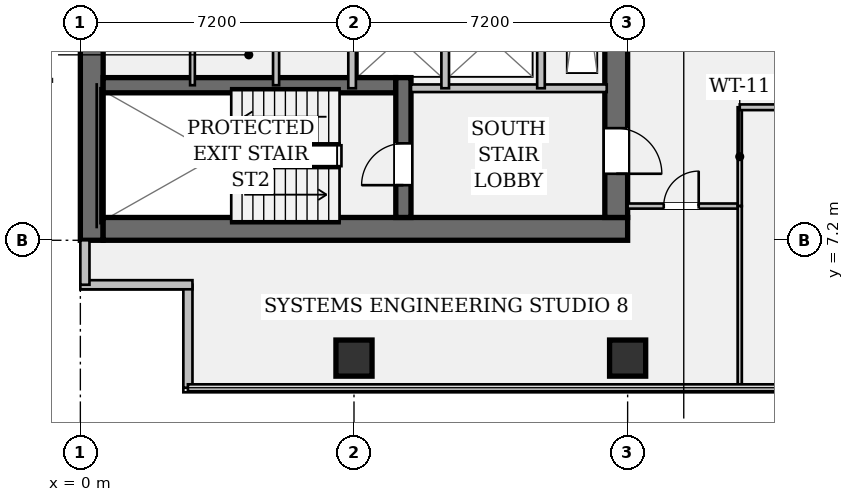
"""IFC4 building model, lengths in metres.
Left out: names, types, materials, properties, quantities, classifications, styles, units other than length and angle.
Written with IfcOpenShell. Run it as: python <this file> out.ifc"""

import sys

from ifc_helpers import new_model, si_unit, direction, frame, frame_2d, origin, origin_2d, place, context, subcontext, project, spatial, rectangle, hollow_rectangle, extrude, element, fill, save


model = new_model("IFC4")
c1 = context("Model", 3, precision=1e-05, world=origin(), true_north=direction((0.0, 1.0)))
c2 = subcontext(c1, "Body", "Model", "MODEL_VIEW")
j1 = project(units=[si_unit("LENGTHUNIT", "METRE"), si_unit("PLANEANGLEUNIT", "RADIAN")], contexts=[c1])
p1 = place(None, origin())
s1 = spatial("IfcSite", under=j1, at=p1, CompositionType="ELEMENT")
p2 = place(p1, origin())
s2 = spatial("IfcBuilding", under=s1, at=p2, CompositionType="ELEMENT")
p3 = place(p2, frame((0.0, 0.0, 109.9)))
s3 = spatial("IfcBuildingStorey", under=s2, at=p3, CompositionType="ELEMENT", Elevation=109.9)
p4 = place(p3, frame((0.3, 7.2, 0.0), z_axis=(0.0, 0.0, 1.0), x_axis=(0.0, 1.0, 0.0)))
e1 = element("IfcWall", 1, at=p4, inside=s3, PredefinedType="SHEAR", context=c2, shape_type="SweptSolid", body=[
    extrude(rectangle(XDim=28.8, YDim=0.6, at=frame_2d((14.4, 0.0))), origin(), (0.0, 0.0, 1.0), 3.58),
])
p5 = place(p3, frame((0.6, 7.5, 0.0), z_axis=(0.0, 0.0, 1.0), x_axis=(1.0, 0.0, 0.0)))
e2 = element("IfcWall", 2, at=p5, inside=s3, PredefinedType="SHEAR", context=c2, shape_type="SweptSolid", body=[
    extrude(rectangle(XDim=13.8, YDim=0.6, at=frame_2d((6.9, 0.0))), origin(), (0.0, 0.0, 1.0), 3.58),
])
p6 = place(p3, frame((14.1, 35.4, 0.0), z_axis=(0.0, 0.0, 1.0), x_axis=(0.0, -1.0, 0.0)))
e3 = element("IfcWall", 3, at=p6, inside=s3, PredefinedType="SHEAR", context=c2, shape_type="SweptSolid", body=[
    extrude(rectangle(XDim=27.6, YDim=0.6, at=frame_2d((13.8, 0.0))), origin(), (0.0, 0.0, 1.0), 3.58),
])
p7 = place(p6, frame((1.3, 0.0, 0.0)))
e4 = element("IfcOpeningElement", 4, at=p7, cuts=e3, PredefinedType="OPENING", context=c2, shape_type="SweptSolid", body=[
    extrude(rectangle(XDim=1.2, YDim=2.15, at=frame_2d((0.6, 1.075))), frame((0.0, 0.312, 0.0), z_axis=(0.0, -1.0, 0.0), x_axis=(1.0, 0.0, 0.0)), (0.0, 0.0, 1.0), 0.624),
])
p8 = place(p6, frame((25.25, 0.0, 0.0)))
e5 = element("IfcOpeningElement", 5, at=p8, cuts=e3, PredefinedType="OPENING", context=c2, shape_type="SweptSolid", body=[
    extrude(rectangle(XDim=1.2, YDim=2.15, at=frame_2d((0.6, 1.075))), frame((0.0, 0.312, 0.0), z_axis=(0.0, -1.0, 0.0), x_axis=(1.0, 0.0, 0.0)), (0.0, 0.0, 1.0), 0.624),
])
p9 = place(p6, frame((14.6, 0.0, 0.0)))
e6 = element("IfcOpeningElement", 6, at=p9, cuts=e3, PredefinedType="OPENING", context=c2, shape_type="SweptSolid", body=[
    extrude(rectangle(XDim=1.6, YDim=2.2, at=frame_2d((0.8, 1.1))), frame((0.0, 0.312, 0.0), z_axis=(0.0, -1.0, 0.0), x_axis=(1.0, 0.0, 0.0)), (0.0, 0.0, 1.0), 0.624),
])
p10 = place(p3, frame((0.6, 11.28, 0.0), z_axis=(0.0, 0.0, 1.0), x_axis=(1.0, 0.0, 0.0)))
e7 = element("IfcWall", 7, at=p10, inside=s3, PredefinedType="SHEAR", context=c2, shape_type="SweptSolid", body=[
    extrude(rectangle(XDim=7.7, YDim=0.4, at=frame_2d((3.85, 0.0))), origin(), (0.0, 0.0, 1.0), 3.58),
])
p11 = place(p3, frame((8.5, 7.8, 0.0), z_axis=(0.0, 0.0, 1.0), x_axis=(0.0, 1.0, 0.0)))
e8 = element("IfcWall", 8, at=p11, inside=s3, PredefinedType="SHEAR", context=c2, shape_type="SweptSolid", body=[
    extrude(rectangle(XDim=3.68, YDim=0.4, at=frame_2d((1.84, 0.0))), origin(), (0.0, 0.0, 1.0), 3.58),
])
p12 = place(p11, frame((0.85, 0.0, 0.0)))
e9 = element("IfcOpeningElement", 9, at=p12, cuts=e8, PredefinedType="OPENING", context=c2, shape_type="SweptSolid", body=[
    extrude(rectangle(XDim=1.1, YDim=2.15, at=frame_2d((0.55, 1.075))), frame((0.0, 0.212, 0.0), z_axis=(0.0, -1.0, 0.0), x_axis=(1.0, 0.0, 0.0)), (0.0, 0.0, 1.0), 0.424),
])
for number, where, z_axis, x_axis in (
    (10, (7.2, 4.1, 0.0), (0.0, 0.0, 1.0), (1.0, 0.0, 0.0)),
    (11, (14.4, 4.1, 0.0), (0.0, 0.0, 1.0), (1.0, 0.0, 0.0)),
):
    element("IfcColumn", number, at=place(p3, frame(where, z_axis=z_axis, x_axis=x_axis)), inside=s3, PredefinedType="COLUMN", context=c2, shape_type="SweptSolid", body=[
        extrude(hollow_rectangle(XDim=0.95, YDim=0.95, WallThickness=0.06, at=origin_2d()), origin(), (0.0, 0.0, 1.0), 3.58),
    ])
p13 = place(p3, frame((2.83, 3.32, 0.0), z_axis=(0.0, 0.0, 1.0), x_axis=(0.0, 1.0, 0.0)))
e12 = element("IfcWall", 12, at=p13, inside=s3, PredefinedType="STANDARD", context=c2, shape_type="SweptSolid", body=[
    extrude(rectangle(XDim=2.71, YDim=0.24, at=frame_2d((1.355, 0.0))), origin(), (0.0, 0.0, 1.0), 3.58),
])
p14 = place(p3, frame((2.95, 6.03, 0.0), z_axis=(0.0, 0.0, 1.0), x_axis=(-1.0, 0.0, 0.0)))
e13 = element("IfcWall", 13, at=p14, inside=s3, PredefinedType="STANDARD", context=c2, shape_type="SweptSolid", body=[
    extrude(rectangle(XDim=2.95, YDim=0.24, at=frame_2d((1.475, 0.0))), origin(), (0.0, 0.0, 1.0), 3.58),
])
p15 = place(p3, frame((0.12, 6.03, 0.0), z_axis=(0.0, 0.0, 1.0), x_axis=(0.0, 1.0, 0.0)))
e14 = element("IfcWall", 14, at=p15, inside=s3, PredefinedType="STANDARD", context=c2, shape_type="SweptSolid", body=[
    extrude(rectangle(XDim=1.17, YDim=0.24, at=frame_2d((0.585, 0.0))), origin(), (0.0, 0.0, 1.0), 3.58),
])
p16 = place(p3, frame((8.7, 11.2, 0.0), z_axis=(0.0, 0.0, 1.0), x_axis=(1.0, 0.0, 0.0)))
e15 = element("IfcWall", 15, at=p16, inside=s3, PredefinedType="PARTITIONING", context=c2, shape_type="SweptSolid", body=[
    extrude(rectangle(XDim=5.15, YDim=0.2, at=frame_2d((2.575, 0.0))), origin(), (0.0, 0.0, 1.0), 3.58),
])
for number, where, z_axis, x_axis in (
    (16, (7.15, 11.2, 0.0), (0.0, 0.0, 1.0), (0.0, 1.0, 0.0)),
    (17, (9.6, 11.2, 0.0), (0.0, 0.0, 1.0), (0.0, 1.0, 0.0)),
):
    element("IfcWall", number, at=place(p3, frame(where, z_axis=z_axis, x_axis=x_axis)), inside=s3, PredefinedType="PARTITIONING", context=c2, shape_type="SweptSolid", body=[
        extrude(rectangle(XDim=2.4, YDim=0.2, at=frame_2d((1.2, 0.0))), origin(), (0.0, 0.0, 1.0), 3.58),
    ])
p17 = place(p3, frame((12.12, 11.2, 0.0), z_axis=(0.0, 0.0, 1.0), x_axis=(0.0, 1.0, 0.0)))
e18 = element("IfcWall", 18, at=p17, inside=s3, PredefinedType="PARTITIONING", context=c2, shape_type="SweptSolid", body=[
    extrude(rectangle(XDim=6.6, YDim=0.2, at=frame_2d((3.3, 0.0))), origin(), (0.0, 0.0, 1.0), 3.58),
])
p18 = place(p17, frame((2.95, 0.0, 0.0)))
e19 = element("IfcOpeningElement", 19, at=p18, cuts=e18, PredefinedType="OPENING", context=c2, shape_type="SweptSolid", body=[
    extrude(rectangle(XDim=0.85, YDim=2.15, at=frame_2d((0.425, 1.075))), frame((0.0, 0.112, 0.0), z_axis=(0.0, -1.0, 0.0), x_axis=(1.0, 0.0, 0.0)), (0.0, 0.0, 1.0), 0.224),
])
p19 = place(p3, frame((5.15, 11.28, 0.0), z_axis=(0.0, 0.0, 1.0), x_axis=(0.0, 1.0, 0.0)))
e20 = element("IfcWall", 20, at=p19, inside=s3, PredefinedType="PARTITIONING", context=c2, shape_type="SweptSolid", body=[
    extrude(rectangle(XDim=4.42, YDim=0.16, at=frame_2d((2.21, 0.0))), origin(), (0.0, 0.0, 1.0), 3.58),
])
p20 = place(p3, frame((2.95, 11.28, 0.0), z_axis=(0.0, 0.0, 1.0), x_axis=(0.0, 1.0, 0.0)))
e21 = element("IfcWall", 21, at=p20, inside=s3, PredefinedType="PARTITIONING", context=c2, shape_type="SweptSolid", body=[
    extrude(rectangle(XDim=4.42, YDim=0.125, at=frame_2d((2.21, 0.0))), origin(), (0.0, 0.0, 1.0), 3.58),
])
p21 = place(p20, frame((1.6, 0.0, 0.0)))
e22 = element("IfcOpeningElement", 22, at=p21, cuts=e21, PredefinedType="OPENING", context=c2, shape_type="SweptSolid", body=[
    extrude(rectangle(XDim=0.85, YDim=2.15, at=frame_2d((0.425, 1.075))), frame((0.0, 0.074, 0.0), z_axis=(0.0, -1.0, 0.0), x_axis=(1.0, 0.0, 0.0)), (0.0, 0.0, 1.0), 0.149),
])
p22 = place(p3, frame((14.4, 8.1, 0.0), z_axis=(0.0, 0.0, 1.0), x_axis=(1.0, 0.0, 0.0)))
e23 = element("IfcWall", 23, at=p22, inside=s3, PredefinedType="PARTITIONING", context=c2, shape_type="SweptSolid", body=[
    extrude(rectangle(XDim=2.95, YDim=0.135, at=frame_2d((1.475, 0.0))), origin(), (0.0, 0.0, 1.0), 3.098),
])
p23 = place(p22, frame((0.95, 0.0, 0.0)))
e24 = element("IfcOpeningElement", 24, at=p23, cuts=e23, PredefinedType="OPENING", context=c2, shape_type="SweptSolid", body=[
    extrude(rectangle(XDim=0.92, YDim=2.15, at=frame_2d((0.46, 1.075))), frame((0.0, 0.08, 0.0), z_axis=(0.0, -1.0, 0.0), x_axis=(1.0, 0.0, 0.0)), (0.0, 0.0, 1.0), 0.159),
])
p24 = place(p3, frame((17.35, 8.1, 0.0), z_axis=(0.0, 0.0, 1.0), x_axis=(0.0, 1.0, 0.0)))
e25 = element("IfcWall", 25, at=p24, inside=s3, PredefinedType="PARTITIONING", context=c2, shape_type="SweptSolid", body=[
    extrude(rectangle(XDim=2.6, YDim=0.11, at=frame_2d((1.3, 0.0))), origin(), (0.0, 0.0, 1.0), 3.58),
])
p25 = place(p3, frame((17.35, 10.7, 0.0), z_axis=(0.0, 0.0, 1.0), x_axis=(1.0, 0.0, 0.0)))
e26 = element("IfcWall", 26, at=p25, inside=s3, PredefinedType="PARTITIONING", context=c2, shape_type="SweptSolid", body=[
    extrude(rectangle(XDim=17.55, YDim=0.15, at=frame_2d((8.775, 0.0))), origin(), (0.0, 0.0, 1.0), 2.793),
])
p26 = place(p25, frame((2.82, 0.0, 0.0)))
e27 = element("IfcOpeningElement", 27, at=p26, cuts=e26, PredefinedType="OPENING", context=c2, shape_type="SweptSolid", body=[
    extrude(rectangle(XDim=0.92, YDim=2.15, at=frame_2d((0.46, 1.075))), frame((0.0, 0.087, 0.0), z_axis=(0.0, -1.0, 0.0), x_axis=(1.0, 0.0, 0.0)), (0.0, 0.0, 1.0), 0.174),
])
p27 = place(p25, frame((9.45, 0.0, 0.0)))
e28 = element("IfcOpeningElement", 28, at=p27, cuts=e26, PredefinedType="OPENING", context=c2, shape_type="SweptSolid", body=[
    extrude(rectangle(XDim=0.92, YDim=2.15, at=frame_2d((0.46, 1.075))), frame((0.0, 0.087, 0.0), z_axis=(0.0, -1.0, 0.0), x_axis=(1.0, 0.0, 0.0)), (0.0, 0.0, 1.0), 0.174),
])
p28 = place(p25, frame((14.9, 0.0, 0.0)))
e29 = element("IfcOpeningElement", 29, at=p28, cuts=e26, PredefinedType="OPENING", context=c2, shape_type="SweptSolid", body=[
    extrude(rectangle(XDim=0.92, YDim=2.15, at=frame_2d((0.46, 1.075))), frame((0.0, 0.087, 0.0), z_axis=(0.0, -1.0, 0.0), x_axis=(1.0, 0.0, 0.0)), (0.0, 0.0, 1.0), 0.174),
])
p29 = place(p3, frame((17.35, 3.32, 0.0), z_axis=(0.0, 0.0, 1.0), x_axis=(0.0, 1.0, 0.0)))
e30 = element("IfcWall", 30, at=p29, inside=s3, PredefinedType="PARTITIONING", context=c2, shape_type="SweptSolid", body=[
    extrude(rectangle(XDim=4.78, YDim=0.11, at=frame_2d((2.39, 0.0))), origin(), (0.0, 0.0, 1.0), 2.793),
])
p30 = place(p12, origin())
e31 = element("IfcDoor", 31, at=p30, inside=s3, OperationType="SINGLE_SWING_LEFT", PredefinedType="DOOR", context=c2, shape_type="SweptSolid", body=[
    extrude(rectangle(XDim=1.1, YDim=2.15, at=frame_2d((0.55, 1.075))), frame((0.0, 0.025, 0.0), z_axis=(0.0, -1.0, 0.0), x_axis=(1.0, 0.0, 0.0)), (0.0, 0.0, 1.0), 0.05),
])
fill(e9, e31)
p31 = place(p8, origin())
e32 = element("IfcDoor", 32, at=p31, inside=s3, OperationType="SINGLE_SWING_RIGHT", PredefinedType="DOOR", context=c2, shape_type="SweptSolid", body=[
    extrude(rectangle(XDim=1.2, YDim=2.15, at=frame_2d((0.6, 1.075))), frame((0.0, 0.025, 0.0), z_axis=(0.0, -1.0, 0.0), x_axis=(1.0, 0.0, 0.0)), (0.0, 0.0, 1.0), 0.05),
])
fill(e5, e32)
p32 = place(p23, origin())
e33 = element("IfcDoor", 33, at=p32, inside=s3, OperationType="SINGLE_SWING_RIGHT", PredefinedType="DOOR", context=c2, shape_type="SweptSolid", body=[
    extrude(rectangle(XDim=0.92, YDim=2.15, at=frame_2d((0.46, 1.075))), frame((0.0, 0.025, 0.0), z_axis=(0.0, -1.0, 0.0), x_axis=(1.0, 0.0, 0.0)), (0.0, 0.0, 1.0), 0.05),
])
fill(e24, e33)
save(model, sys.argv[1])
